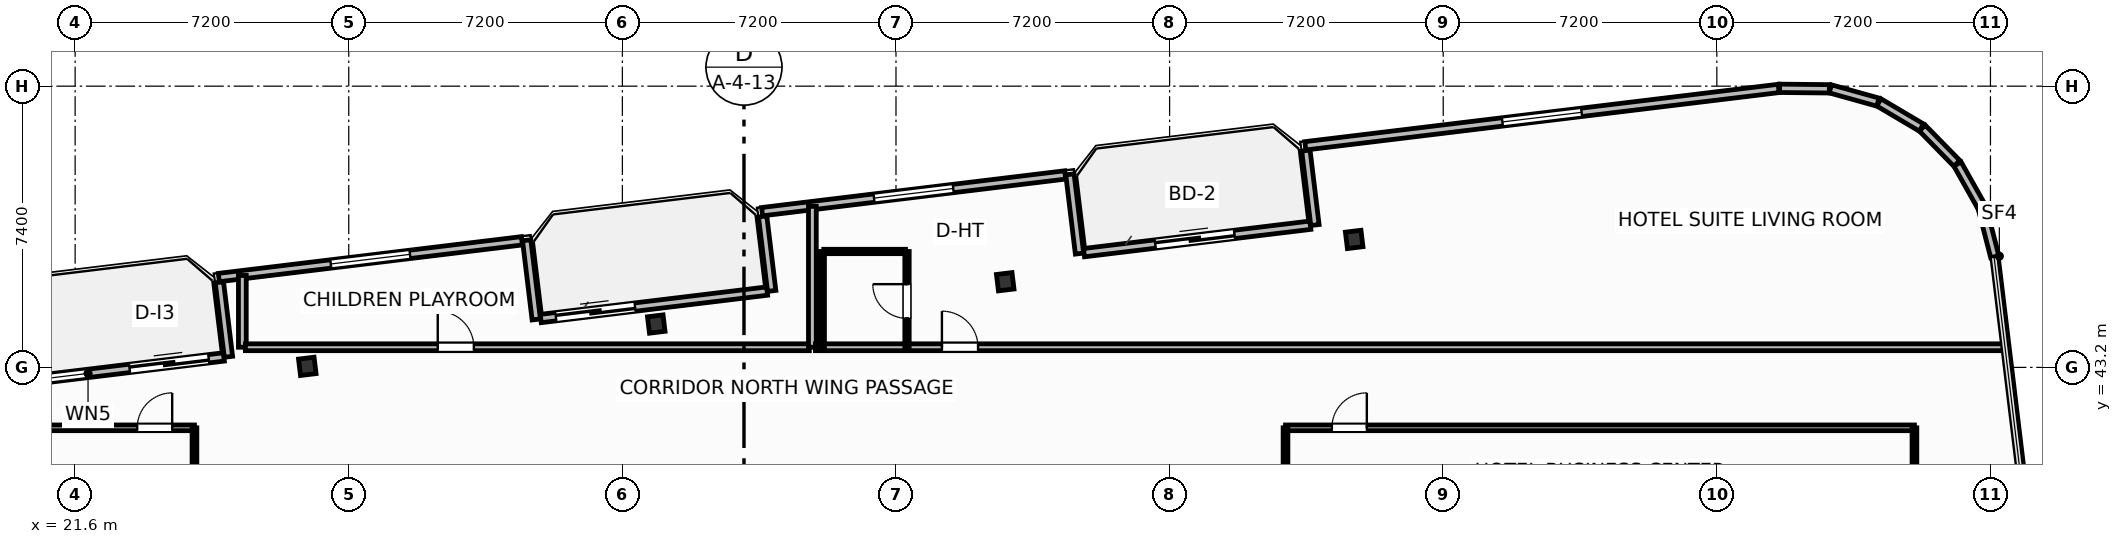
"""IFC4 building model, lengths in metres.
Left out: names, types, materials, properties, quantities, classifications, styles, units other than length and angle.
Written with IfcOpenShell. Run it as: python <this file> out.ifc"""

import sys

from ifc_helpers import new_model, si_unit, direction, frame, frame_2d, origin, origin_2d, place, context, subcontext, project, spatial, rectangle, i_section, extrude, element, fill, save


model = new_model("IFC4")
c1 = context("Model", 3, precision=1e-05, world=origin(), true_north=direction((0.0, 1.0)))
c2 = subcontext(c1, "Body", "Model", "MODEL_VIEW")
j1 = project(units=[si_unit("LENGTHUNIT", "METRE"), si_unit("PLANEANGLEUNIT", "RADIAN")], contexts=[c1])
p1 = place(None, origin())
s1 = spatial("IfcSite", under=j1, at=p1, CompositionType="ELEMENT")
p2 = place(p1, origin())
s2 = spatial("IfcBuilding", under=s1, at=p2, CompositionType="ELEMENT")
p3 = place(p2, frame((0.0, 0.0, 196.8)))
s3 = spatial("IfcBuildingStorey", under=s2, at=p3, CompositionType="ELEMENT", Elevation=196.8)
for number, where, z_axis, x_axis in (
    (1, (55.257, 46.567, 0.0), (0.0, 0.0, 1.0), (0.993, 0.12, 0.0)),
    (2, (46.075, 45.454, 0.0), (0.0, 0.0, 1.0), (0.993, 0.12, 0.0)),
    (3, (36.892, 44.341, 0.0), (0.0, 0.0, 1.0), (0.993, 0.12, 0.0)),
    (4, (27.709, 43.227, 0.0), (0.0, 0.0, 1.0), (0.993, 0.12, 0.0)),
):
    element("IfcColumn", number, at=place(p3, frame(where, z_axis=z_axis, x_axis=x_axis)), inside=s3, PredefinedType="COLUMN", context=c2, shape_type="SweptSolid", body=[
        extrude(i_section(OverallWidth=0.412, OverallDepth=0.435, WebThickness=0.036, FlangeThickness=0.057, FilletRadius=0.025, at=origin_2d()), origin(), (0.0, 0.0, 1.0), 3.7),
    ])
p4 = place(p3, frame((19.557, 42.753, 0.0), z_axis=(0.0, 0.0, 1.0), x_axis=(0.992729951822, 0.120362962556, 0.0)))
e5 = element("IfcWall", 5, at=p4, inside=s3, PredefinedType="SOLIDWALL", context=c2, shape_type="SweptSolid", body=[
    extrude(rectangle(XDim=6.0, YDim=0.22, at=frame_2d((3.0, 0.0))), origin(), (0.0, 0.0, 1.0), 2.73),
])
p5 = place(p4, frame((3.5, 0.0, 0.0)))
e6 = element("IfcOpeningElement", 6, at=p5, cuts=e5, PredefinedType="OPENING", context=c2, shape_type="SweptSolid", body=[
    extrude(rectangle(XDim=2.1, YDim=2.3, at=frame_2d((1.05, 1.15))), frame((0.0, 0.12, 0.0), z_axis=(0.0, -1.0, 0.0), x_axis=(1.0, 0.0, 0.0)), (0.0, 0.0, 1.0), 0.24),
])
p6 = place(p4, frame((0.55, 0.0, 0.75)))
e7 = element("IfcOpeningElement", 7, at=p6, cuts=e5, PredefinedType="OPENING", context=c2, shape_type="SweptSolid", body=[
    extrude(rectangle(XDim=1.85, YDim=1.75, at=frame_2d((0.925, 0.875))), frame((0.0, 0.12, 0.0), z_axis=(0.0, -1.0, 0.0), x_axis=(1.0, 0.0, 0.0)), (0.0, 0.0, 1.0), 0.24),
])
p7 = place(p3, frame((33.852, 44.486, 0.0), z_axis=(0.0, 0.0, 1.0), x_axis=(0.992729951822, 0.120362962556, 0.0)))
e8 = element("IfcWall", 8, at=p7, inside=s3, PredefinedType="SOLIDWALL", context=c2, shape_type="SweptSolid", body=[
    extrude(rectangle(XDim=6.0, YDim=0.22, at=frame_2d((3.0, 0.0))), origin(), (0.0, 0.0, 1.0), 2.73),
])
p8 = place(p7, frame((0.4, 0.0, 0.0)))
e9 = element("IfcOpeningElement", 9, at=p8, cuts=e8, PredefinedType="OPENING", context=c2, shape_type="SweptSolid", body=[
    extrude(rectangle(XDim=2.1, YDim=2.3, at=frame_2d((1.05, 1.15))), frame((0.0, 0.12, 0.0), z_axis=(0.0, -1.0, 0.0), x_axis=(1.0, 0.0, 0.0)), (0.0, 0.0, 1.0), 0.24),
])
p9 = place(p3, frame((48.148, 46.219, 0.0), z_axis=(0.0, 0.0, 1.0), x_axis=(0.992729951822, 0.120362962556, 0.0)))
e10 = element("IfcWall", 10, at=p9, inside=s3, PredefinedType="SOLIDWALL", context=c2, shape_type="SweptSolid", body=[
    extrude(rectangle(XDim=6.0, YDim=0.22, at=frame_2d((3.0, 0.0))), origin(), (0.0, 0.0, 1.0), 2.73),
])
p10 = place(p9, frame((1.888, 0.0, 0.0)))
e11 = element("IfcOpeningElement", 11, at=p10, cuts=e10, PredefinedType="OPENING", context=c2, shape_type="SweptSolid", body=[
    extrude(rectangle(XDim=2.1, YDim=2.3, at=frame_2d((1.05, 1.15))), frame((0.0, 0.12, 0.0), z_axis=(0.0, -1.0, 0.0), x_axis=(1.0, 0.0, 0.0)), (0.0, 0.0, 1.0), 0.24),
])
p11 = place(p3, frame((72.114, 46.112, 0.0), z_axis=(0.0, 0.0, 1.0), x_axis=(-0.248942347653, 0.968518305219, 0.0)))
e12 = element("IfcWall", 12, at=p11, inside=s3, PredefinedType="SOLIDWALL", context=c2, shape_type="SweptSolid", body=[
    extrude(rectangle(XDim=1.326, YDim=0.22, at=frame_2d((0.663, 0.0))), origin(), (0.0, 0.0, 1.0), 2.73),
])
p12 = place(p3, frame((71.771, 47.418, 0.0), z_axis=(0.0, 0.0, 1.0), x_axis=(-0.491098509465, 0.871104043155, 0.0)))
e13 = element("IfcWall", 13, at=p12, inside=s3, PredefinedType="SOLIDWALL", context=c2, shape_type="SweptSolid", body=[
    extrude(rectangle(XDim=1.301, YDim=0.22, at=frame_2d((0.65, 0.0))), origin(), (0.0, 0.0, 1.0), 2.73),
])
p13 = place(p3, frame((71.115, 48.569, 0.0), z_axis=(0.0, 0.0, 1.0), x_axis=(-0.699844331926, 0.714295394827, 0.0)))
e14 = element("IfcWall", 14, at=p13, inside=s3, PredefinedType="SOLIDWALL", context=c2, shape_type="SweptSolid", body=[
    extrude(rectangle(XDim=1.301, YDim=0.22, at=frame_2d((0.65, 0.0))), origin(), (0.0, 0.0, 1.0), 2.73),
])
p14 = place(p3, frame((70.183, 49.511, 0.0), z_axis=(0.0, 0.0, 1.0), x_axis=(-0.860933999601, 0.508716668029, 0.0)))
e15 = element("IfcWall", 15, at=p14, inside=s3, PredefinedType="SOLIDWALL", context=c2, shape_type="SweptSolid", body=[
    extrude(rectangle(XDim=1.301, YDim=0.22, at=frame_2d((0.65, 0.0))), origin(), (0.0, 0.0, 1.0), 2.73),
])
p15 = place(p3, frame((69.039, 50.18, 0.0), z_axis=(0.0, 0.0, 1.0), x_axis=(-0.963205341366, 0.26876657226, 0.0)))
e16 = element("IfcWall", 16, at=p15, inside=s3, PredefinedType="SOLIDWALL", context=c2, shape_type="SweptSolid", body=[
    extrude(rectangle(XDim=1.301, YDim=0.22, at=frame_2d((0.65, 0.0))), origin(), (0.0, 0.0, 1.0), 2.73),
])
p16 = place(p3, frame((67.761, 50.53, 0.0), z_axis=(0.0, 0.0, 1.0), x_axis=(-0.999947358106, 0.010260653861, 0.0)))
e17 = element("IfcWall", 17, at=p16, inside=s3, PredefinedType="SOLIDWALL", context=c2, shape_type="SweptSolid", body=[
    extrude(rectangle(XDim=1.309, YDim=0.22, at=frame_2d((0.654, 0.0))), origin(), (0.0, 0.0, 1.0), 2.73),
])
p17 = place(p3, frame((66.427, 50.54, 0.0), z_axis=(0.0, 0.0, 1.0), x_axis=(-0.992731739233, -0.120348219431, 0.0)))
e18 = element("IfcWall", 18, at=p17, inside=s3, PredefinedType="SOLIDWALL", context=c2, shape_type="SweptSolid", body=[
    extrude(rectangle(XDim=12.547, YDim=0.22, at=frame_2d((6.273, 0.0))), origin(), (0.0, 0.0, 1.0), 2.73),
])
p18 = place(p17, frame((5.224, 0.0, 0.8)))
e19 = element("IfcOpeningElement", 19, at=p18, cuts=e18, PredefinedType="OPENING", context=c2, shape_type="SweptSolid", body=[
    extrude(rectangle(XDim=2.1, YDim=1.75, at=frame_2d((1.05, 0.875))), frame((0.0, 0.12, 0.0), z_axis=(0.0, -1.0, 0.0), x_axis=(1.0, 0.0, 0.0)), (0.0, 0.0, 1.0), 0.24),
])
p19 = place(p3, frame((53.987, 48.906, 0.0), z_axis=(0.0, 0.0, 1.0), x_axis=(0.120397815541, -0.992725725472, 0.0)))
e20 = element("IfcWall", 20, at=p19, inside=s3, PredefinedType="SOLIDWALL", context=c2, shape_type="SweptSolid", body=[
    extrude(rectangle(XDim=1.975, YDim=0.22, at=frame_2d((0.988, 0.0))), origin(), (0.0, 0.0, 1.0), 2.73),
])
p20 = place(p3, frame((48.03, 46.194, 0.0), z_axis=(0.0, 0.0, 1.0), x_axis=(-0.120314009587, 0.992735885871, 0.0)))
e21 = element("IfcWall", 21, at=p20, inside=s3, PredefinedType="SOLIDWALL", context=c2, shape_type="SweptSolid", body=[
    extrude(rectangle(XDim=2.1, YDim=0.22, at=frame_2d((1.05, 0.0))), origin(), (0.0, 0.0, 1.0), 2.73),
])
p21 = place(p3, frame((47.653, 48.264, 0.0), z_axis=(0.0, 0.0, 1.0), x_axis=(-0.992731032022, -0.120354052946, 0.0)))
e22 = element("IfcWall", 22, at=p21, inside=s3, PredefinedType="SOLIDWALL", context=c2, shape_type="SweptSolid", body=[
    extrude(rectangle(XDim=8.035, YDim=0.22, at=frame_2d((4.018, 0.0))), origin(), (0.0, 0.0, 1.0), 2.73),
])
p22 = place(p21, frame((2.968, 0.0, 0.8)))
e23 = element("IfcOpeningElement", 23, at=p22, cuts=e22, PredefinedType="OPENING", context=c2, shape_type="SweptSolid", body=[
    extrude(rectangle(XDim=2.1, YDim=1.75, at=frame_2d((1.05, 0.875))), frame((0.0, 0.12, 0.0), z_axis=(0.0, -1.0, 0.0), x_axis=(1.0, 0.0, 0.0)), (0.0, 0.0, 1.0), 0.24),
])
p23 = place(p3, frame((39.691, 47.173, 0.0), z_axis=(0.0, 0.0, 1.0), x_axis=(0.120397815541, -0.992725725472, 0.0)))
e24 = element("IfcWall", 24, at=p23, inside=s3, PredefinedType="SOLIDWALL", context=c2, shape_type="SweptSolid", body=[
    extrude(rectangle(XDim=1.975, YDim=0.22, at=frame_2d((0.988, 0.0))), origin(), (0.0, 0.0, 1.0), 2.73),
])
p24 = place(p3, frame((33.734, 44.461, 0.0), z_axis=(0.0, 0.0, 1.0), x_axis=(-0.120327895535, 0.992734202874, 0.0)))
e25 = element("IfcWall", 25, at=p24, inside=s3, PredefinedType="SOLIDWALL", context=c2, shape_type="SweptSolid", body=[
    extrude(rectangle(XDim=2.1, YDim=0.22, at=frame_2d((1.05, 0.0))), origin(), (0.0, 0.0, 1.0), 2.73),
])
p25 = place(p3, frame((33.357, 46.531, 0.0), z_axis=(0.0, 0.0, 1.0), x_axis=(-0.992731032022, -0.120354052946, 0.0)))
e26 = element("IfcWall", 26, at=p25, inside=s3, PredefinedType="SOLIDWALL", context=c2, shape_type="SweptSolid", body=[
    extrude(rectangle(XDim=8.035, YDim=0.22, at=frame_2d((4.018, 0.0))), origin(), (0.0, 0.0, 1.0), 2.73),
])
p26 = place(p25, frame((2.968, 0.0, 0.8)))
e27 = element("IfcOpeningElement", 27, at=p26, cuts=e26, PredefinedType="OPENING", context=c2, shape_type="SweptSolid", body=[
    extrude(rectangle(XDim=2.1, YDim=1.75, at=frame_2d((1.05, 0.875))), frame((0.0, 0.12, 0.0), z_axis=(0.0, -1.0, 0.0), x_axis=(1.0, 0.0, 0.0)), (0.0, 0.0, 1.0), 0.24),
])
p27 = place(p3, frame((25.396, 45.44, 0.0), z_axis=(0.0, 0.0, 1.0), x_axis=(0.120275992932, -0.992740492538, 0.0)))
e28 = element("IfcWall", 28, at=p27, inside=s3, PredefinedType="SOLIDWALL", context=c2, shape_type="SweptSolid", body=[
    extrude(rectangle(XDim=1.975, YDim=0.22, at=frame_2d((0.988, 0.0))), origin(), (0.0, 0.0, 1.0), 2.73),
])
p28 = place(p3, frame((5.0, 41.61, 0.0), z_axis=(0.0, 0.0, 1.0), x_axis=(1.0, 0.0, 0.0)))
e29 = element("IfcWall", 29, at=p28, inside=s3, PredefinedType="PARTITIONING", context=c2, shape_type="SweptSolid", body=[
    extrude(rectangle(XDim=19.74, YDim=0.15, at=frame_2d((9.87, 0.0))), origin(), (0.0, 0.0, 1.0), 2.662),
])
p29 = place(p28, frame((18.234, 0.0, 0.0)))
e30 = element("IfcOpeningElement", 30, at=p29, cuts=e29, PredefinedType="OPENING", context=c2, shape_type="SweptSolid", body=[
    extrude(rectangle(XDim=0.92, YDim=2.05, at=frame_2d((0.46, 1.025))), frame((0.0, 0.085, 0.0), z_axis=(0.0, -1.0, 0.0), x_axis=(1.0, 0.0, 0.0)), (0.0, 0.0, 1.0), 0.17),
])
p30 = place(p3, frame((24.74, 39.3, 0.0), z_axis=(0.0, 0.0, 1.0), x_axis=(0.0, 1.0, 0.0)))
e31 = element("IfcWall", 31, at=p30, inside=s3, PredefinedType="PARTITIONING", context=c2, shape_type="SweptSolid", body=[
    extrude(rectangle(XDim=2.31, YDim=0.125, at=frame_2d((1.155, 0.0))), origin(), (0.0, 0.0, 1.0), 3.45),
])
p31 = place(p3, frame((53.45, 41.61, 0.0), z_axis=(0.0, 0.0, 1.0), x_axis=(1.0, 0.0, 0.0)))
e32 = element("IfcWall", 32, at=p31, inside=s3, PredefinedType="PARTITIONING", context=c2, shape_type="SweptSolid", body=[
    extrude(rectangle(XDim=16.55, YDim=0.15, at=frame_2d((8.275, 0.0))), origin(), (0.0, 0.0, 1.0), 3.45),
])
p32 = place(p31, frame((1.22, 0.0, 0.0)))
e33 = element("IfcOpeningElement", 33, at=p32, cuts=e32, PredefinedType="OPENING", context=c2, shape_type="SweptSolid", body=[
    extrude(rectangle(XDim=0.92, YDim=2.05, at=frame_2d((0.46, 1.025))), frame((0.0, 0.085, 0.0), z_axis=(0.0, -1.0, 0.0), x_axis=(1.0, 0.0, 0.0)), (0.0, 0.0, 1.0), 0.17),
])
for number, where, z_axis, x_axis in (
    (34, (53.45, 39.3, 0.0), (0.0, 0.0, 1.0), (0.0, 1.0, 0.0)),
    (35, (70.0, 39.3, 0.0), (0.0, 0.0, 1.0), (0.0, 1.0, 0.0)),
):
    element("IfcWall", number, at=place(p3, frame(where, z_axis=z_axis, x_axis=x_axis)), inside=s3, PredefinedType="PARTITIONING", context=c2, shape_type="SweptSolid", body=[
        extrude(rectangle(XDim=2.31, YDim=0.125, at=frame_2d((1.155, 0.0))), origin(), (0.0, 0.0, 1.0), 3.45),
    ])
p33 = place(p3, frame((26.0, 43.73, 0.0), z_axis=(0.0, 0.0, 1.0), x_axis=(0.0, 1.0, 0.0)))
e36 = element("IfcWall", 36, at=p33, inside=s3, PredefinedType="PARTITIONING", context=c2, shape_type="SweptSolid", body=[
    extrude(rectangle(XDim=1.889, YDim=0.205, at=frame_2d((0.945, 0.0))), origin(), (0.0, 0.0, 1.0), 3.45),
])
p34 = place(p3, frame((26.08, 43.73, 0.0), z_axis=(0.0, 0.0, 1.0), x_axis=(1.0, 0.0, 0.0)))
e37 = element("IfcWall", 37, at=p34, inside=s3, PredefinedType="PARTITIONING", context=c2, shape_type="SweptSolid", body=[
    extrude(rectangle(XDim=14.84, YDim=0.18, at=frame_2d((7.42, 0.0))), origin(), (0.0, 0.0, 1.0), 2.824),
])
p35 = place(p34, frame((5.062, 0.0, 0.0)))
e38 = element("IfcOpeningElement", 38, at=p35, cuts=e37, PredefinedType="OPENING", context=c2, shape_type="SweptSolid", body=[
    extrude(rectangle(XDim=0.95, YDim=2.05, at=frame_2d((0.475, 1.025))), frame((0.0, 0.1, 0.0), z_axis=(0.0, -1.0, 0.0), x_axis=(1.0, 0.0, 0.0)), (0.0, 0.0, 1.0), 0.2),
])
p36 = place(p3, frame((41.0, 43.73, 0.0), z_axis=(0.0, 0.0, 1.0), x_axis=(0.0, 1.0, 0.0)))
e39 = element("IfcWall", 39, at=p36, inside=s3, PredefinedType="PARTITIONING", context=c2, shape_type="SweptSolid", body=[
    extrude(rectangle(XDim=3.708, YDim=0.205, at=frame_2d((1.854, 0.0))), origin(), (0.0, 0.0, 1.0), 3.45),
])
p37 = place(p3, frame((41.08, 43.73, 0.0), z_axis=(0.0, 0.0, 1.0), x_axis=(1.0, 0.0, 0.0)))
e40 = element("IfcWall", 40, at=p37, inside=s3, PredefinedType="PARTITIONING", context=c2, shape_type="SweptSolid", body=[
    extrude(rectangle(XDim=31.263, YDim=0.18, at=frame_2d((15.632, 0.0))), origin(), (0.0, 0.0, 1.0), 3.018),
])
p38 = place(p37, frame((3.329, 0.0, 0.0)))
e41 = element("IfcOpeningElement", 41, at=p38, cuts=e40, PredefinedType="OPENING", context=c2, shape_type="SweptSolid", body=[
    extrude(rectangle(XDim=0.95, YDim=2.15, at=frame_2d((0.475, 1.075))), frame((0.0, 0.1, 0.0), z_axis=(0.0, -1.0, 0.0), x_axis=(1.0, 0.0, 0.0)), (0.0, 0.0, 1.0), 0.2),
])
p39 = place(p3, frame((41.3, 46.25, 0.0), z_axis=(0.0, 0.0, 1.0), x_axis=(1.0, 0.0, 0.0)))
e42 = element("IfcWall", 42, at=p39, inside=s3, PredefinedType="PARTITIONING", context=c2, shape_type="SweptSolid", body=[
    extrude(rectangle(XDim=2.15, YDim=0.115, at=frame_2d((1.075, 0.0))), origin(), (0.0, 0.0, 1.0), 3.45),
])
p40 = place(p3, frame((43.49, 43.73, 0.0), z_axis=(0.0, 0.0, 1.0), x_axis=(0.0, 1.0, 0.0)))
e43 = element("IfcWall", 43, at=p40, inside=s3, PredefinedType="PARTITIONING", context=c2, shape_type="SweptSolid", body=[
    extrude(rectangle(XDim=2.52, YDim=0.115, at=frame_2d((1.26, 0.0))), origin(), (0.0, 0.0, 1.0), 3.45),
])
p41 = place(p40, frame((0.76, 0.0, 0.0)))
e44 = element("IfcOpeningElement", 44, at=p41, cuts=e43, PredefinedType="OPENING", context=c2, shape_type="SweptSolid", body=[
    extrude(rectangle(XDim=0.9, YDim=2.05, at=frame_2d((0.45, 1.025))), frame((0.0, 0.067, 0.0), z_axis=(0.0, -1.0, 0.0), x_axis=(1.0, 0.0, 0.0)), (0.0, 0.0, 1.0), 0.135),
])
p42 = place(p3, frame((41.26, 43.73, 0.0), z_axis=(0.0, 0.0, 1.0), x_axis=(0.0, 1.0, 0.0)))
e45 = element("IfcWall", 45, at=p42, inside=s3, PredefinedType="PARTITIONING", context=c2, shape_type="SweptSolid", body=[
    extrude(rectangle(XDim=2.52, YDim=0.115, at=frame_2d((1.26, 0.0))), origin(), (0.0, 0.0, 1.0), 3.45),
])
p43 = place(p5, origin())
e46 = element("IfcDoor", 46, at=p43, inside=s3, OperationType="SLIDING_TO_LEFT", PredefinedType="DOOR", context=c2, shape_type="SweptSolid", body=[
    extrude(rectangle(XDim=2.1, YDim=2.3, at=frame_2d((1.05, 1.15))), frame((0.0, 0.025, 0.0), z_axis=(0.0, -1.0, 0.0), x_axis=(1.0, 0.0, 0.0)), (0.0, 0.0, 1.0), 0.05),
])
fill(e6, e46)
p44 = place(p6, origin())
e47 = element("IfcWindow", 47, at=p44, inside=s3, PartitioningType="SINGLE_PANEL", PredefinedType="WINDOW", context=c2, shape_type="SweptSolid", body=[
    extrude(rectangle(XDim=1.85, YDim=1.75, at=frame_2d((0.925, 0.875))), frame((0.0, 0.03, 0.0), z_axis=(0.0, -1.0, 0.0), x_axis=(1.0, 0.0, 0.0)), (0.0, 0.0, 1.0), 0.06),
])
fill(e7, e47)
p45 = place(p8, origin())
e48 = element("IfcDoor", 48, at=p45, inside=s3, OperationType="SLIDING_TO_LEFT", PredefinedType="DOOR", context=c2, shape_type="SweptSolid", body=[
    extrude(rectangle(XDim=2.1, YDim=2.3, at=frame_2d((1.05, 1.15))), frame((0.0, 0.025, 0.0), z_axis=(0.0, -1.0, 0.0), x_axis=(1.0, 0.0, 0.0)), (0.0, 0.0, 1.0), 0.05),
])
fill(e9, e48)
p46 = place(p10, origin())
e49 = element("IfcDoor", 49, at=p46, inside=s3, OperationType="SLIDING_TO_LEFT", PredefinedType="DOOR", context=c2, shape_type="SweptSolid", body=[
    extrude(rectangle(XDim=2.1, YDim=2.3, at=frame_2d((1.05, 1.15))), frame((0.0, 0.025, 0.0), z_axis=(0.0, -1.0, 0.0), x_axis=(1.0, 0.0, 0.0)), (0.0, 0.0, 1.0), 0.05),
])
fill(e11, e49)
p47 = place(p18, origin())
e50 = element("IfcWindow", 50, at=p47, inside=s3, PartitioningType="SINGLE_PANEL", PredefinedType="WINDOW", context=c2, shape_type="SweptSolid", body=[
    extrude(rectangle(XDim=2.1, YDim=1.75, at=frame_2d((1.05, 0.875))), frame((0.0, 0.03, 0.0), z_axis=(0.0, -1.0, 0.0), x_axis=(1.0, 0.0, 0.0)), (0.0, 0.0, 1.0), 0.06),
])
fill(e19, e50)
p48 = place(p22, origin())
e51 = element("IfcWindow", 51, at=p48, inside=s3, PartitioningType="SINGLE_PANEL", PredefinedType="WINDOW", context=c2, shape_type="SweptSolid", body=[
    extrude(rectangle(XDim=2.1, YDim=1.75, at=frame_2d((1.05, 0.875))), frame((0.0, 0.03, 0.0), z_axis=(0.0, -1.0, 0.0), x_axis=(1.0, 0.0, 0.0)), (0.0, 0.0, 1.0), 0.06),
])
fill(e23, e51)
p49 = place(p26, origin())
e52 = element("IfcWindow", 52, at=p49, inside=s3, PartitioningType="SINGLE_PANEL", PredefinedType="WINDOW", context=c2, shape_type="SweptSolid", body=[
    extrude(rectangle(XDim=2.1, YDim=1.75, at=frame_2d((1.05, 0.875))), frame((0.0, 0.03, 0.0), z_axis=(0.0, -1.0, 0.0), x_axis=(1.0, 0.0, 0.0)), (0.0, 0.0, 1.0), 0.06),
])
fill(e27, e52)
p50 = place(p29, origin())
e53 = element("IfcDoor", 53, at=p50, inside=s3, OperationType="SINGLE_SWING_RIGHT", PredefinedType="DOOR", context=c2, shape_type="SweptSolid", body=[
    extrude(rectangle(XDim=0.92, YDim=2.05, at=frame_2d((0.46, 1.025))), frame((0.0, 0.025, 0.0), z_axis=(0.0, -1.0, 0.0), x_axis=(1.0, 0.0, 0.0)), (0.0, 0.0, 1.0), 0.05),
])
fill(e30, e53)
p51 = place(p32, origin())
e54 = element("IfcDoor", 54, at=p51, inside=s3, OperationType="SINGLE_SWING_RIGHT", PredefinedType="DOOR", context=c2, shape_type="SweptSolid", body=[
    extrude(rectangle(XDim=0.92, YDim=2.05, at=frame_2d((0.46, 1.025))), frame((0.0, 0.025, 0.0), z_axis=(0.0, -1.0, 0.0), x_axis=(1.0, 0.0, 0.0)), (0.0, 0.0, 1.0), 0.05),
])
fill(e33, e54)
p52 = place(p35, origin())
e55 = element("IfcDoor", 55, at=p52, inside=s3, OperationType="SINGLE_SWING_LEFT", PredefinedType="DOOR", context=c2, shape_type="SweptSolid", body=[
    extrude(rectangle(XDim=0.95, YDim=2.05, at=frame_2d((0.475, 1.025))), frame((0.0, 0.025, 0.0), z_axis=(0.0, -1.0, 0.0), x_axis=(1.0, 0.0, 0.0)), (0.0, 0.0, 1.0), 0.05),
])
fill(e38, e55)
p53 = place(p38, origin())
e56 = element("IfcDoor", 56, at=p53, inside=s3, OperationType="SINGLE_SWING_LEFT", PredefinedType="DOOR", context=c2, shape_type="SweptSolid", body=[
    extrude(rectangle(XDim=0.95, YDim=2.15, at=frame_2d((0.475, 1.075))), frame((0.0, 0.025, 0.0), z_axis=(0.0, -1.0, 0.0), x_axis=(1.0, 0.0, 0.0)), (0.0, 0.0, 1.0), 0.05),
])
fill(e41, e56)
p54 = place(p41, origin())
e57 = element("IfcDoor", 57, at=p54, inside=s3, OperationType="SINGLE_SWING_RIGHT", PredefinedType="DOOR", context=c2, shape_type="SweptSolid", body=[
    extrude(rectangle(XDim=0.9, YDim=2.05, at=frame_2d((0.45, 1.025))), frame((0.0, 0.025, 0.0), z_axis=(0.0, -1.0, 0.0), x_axis=(1.0, 0.0, 0.0)), (0.0, 0.0, 1.0), 0.05),
])
fill(e44, e57)
save(model, sys.argv[1])
